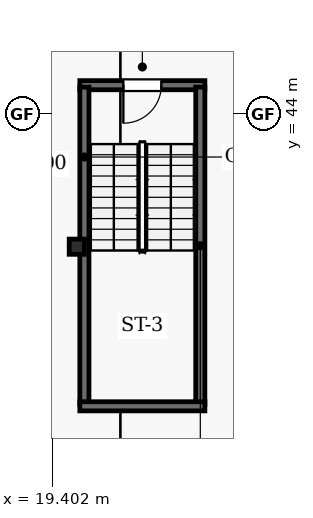
"""IFC4 building model, lengths in metres.
Left out: names, types, materials, properties, quantities, classifications, styles, units other than length and angle.
Written with IfcOpenShell. Run it as: python <this file> out.ifc"""

import sys

from ifc_helpers import new_model, si_unit, direction, frame, frame_2d, origin, origin_2d, place, context, subcontext, project, spatial, rectangle, i_section, extrude, element, fill, save


model = new_model("IFC4")
c1 = context("Model", 3, precision=1e-05, world=origin(), true_north=direction((0.0, 1.0)))
c2 = subcontext(c1, "Body", "Model", "MODEL_VIEW")
j1 = project(units=[si_unit("LENGTHUNIT", "METRE"), si_unit("PLANEANGLEUNIT", "RADIAN")], contexts=[c1])
p1 = place(None, origin())
s1 = spatial("IfcSite", under=j1, at=p1, CompositionType="ELEMENT")
p2 = place(p1, origin())
s2 = spatial("IfcBuilding", under=s1, at=p2, CompositionType="ELEMENT")
p3 = place(p2, frame((0.0, 0.0, -15.6)))
s3 = spatial("IfcBuildingStorey", under=s2, at=p3, CompositionType="ELEMENT", Elevation=-15.6)
p4 = place(p3, frame((20.05, 40.5, 0.0), z_axis=(0.0, 0.0, 1.0), x_axis=(1.0, 0.0, 0.0)))
e1 = element("IfcColumn", 1, at=p4, inside=s3, PredefinedType="PILASTER", context=c2, shape_type="SweptSolid", body=[
    extrude(i_section(OverallWidth=0.4, OverallDepth=0.4, WebThickness=0.013, FlangeThickness=0.021, FilletRadius=0.022, at=origin_2d()), origin(), (0.0, 0.0, 1.0), 3.9),
])
p5 = place(p3, frame((20.13, 44.75, 0.0), z_axis=(0.0, 0.0, 1.0), x_axis=(1.0, 0.0, 0.0)))
e2 = element("IfcWall", 2, at=p5, inside=s3, PredefinedType="SHEAR", context=c2, shape_type="SweptSolid", body=[
    extrude(rectangle(XDim=3.29, YDim=0.24, at=frame_2d((1.645, 0.0))), origin(), (0.0, 0.0, 1.0), 3.58),
])
p6 = place(p5, frame((1.145, 0.0, 0.0)))
e3 = element("IfcOpeningElement", 3, at=p6, cuts=e2, PredefinedType="OPENING", context=c2, shape_type="SweptSolid", body=[
    extrude(rectangle(XDim=1.0, YDim=2.15, at=frame_2d((0.5, 1.075))), frame((0.0, 0.13, 0.0), z_axis=(0.0, -1.0, 0.0), x_axis=(1.0, 0.0, 0.0)), (0.0, 0.0, 1.0), 0.26),
])
for number, where, z_axis, x_axis in (
    (4, (20.25, 36.35, 0.0), (0.0, 0.0, 1.0), (0.0, 1.0, 0.0)),
    (5, (23.3, 36.35, 0.0), (0.0, 0.0, 1.0), (0.0, 1.0, 0.0)),
):
    element("IfcWall", number, at=place(p3, frame(where, z_axis=z_axis, x_axis=x_axis)), inside=s3, PredefinedType="SHEAR", context=c2, shape_type="SweptSolid", body=[
        extrude(rectangle(XDim=8.35, YDim=0.24, at=frame_2d((4.175, 0.0))), origin(), (0.0, 0.0, 1.0), 3.58),
    ])
p7 = place(p3, frame((20.13, 36.3, 0.0), z_axis=(0.0, 0.0, 1.0), x_axis=(1.0, 0.0, 0.0)))
e6 = element("IfcWall", 6, at=p7, inside=s3, PredefinedType="SHEAR", context=c2, shape_type="SweptSolid", body=[
    extrude(rectangle(XDim=3.29, YDim=0.24, at=frame_2d((1.645, 0.0))), origin(), (0.0, 0.0, 1.0), 3.58),
])
p8 = place(p6, frame((1.0, 0.0, 0.0), z_axis=(0.0, 0.0, 1.0), x_axis=(-1.0, 0.0, 0.0)))
e7 = element("IfcDoor", 7, at=p8, inside=s3, OperationType="SINGLE_SWING_LEFT", PredefinedType="DOOR", context=c2, shape_type="SweptSolid", body=[
    extrude(rectangle(XDim=1.0, YDim=2.15, at=frame_2d((0.5, 1.075))), frame((0.0, 0.025, 0.0), z_axis=(0.0, -1.0, 0.0), x_axis=(1.0, 0.0, 0.0)), (0.0, 0.0, 1.0), 0.05),
])
fill(e3, e7)
save(model, sys.argv[1])
